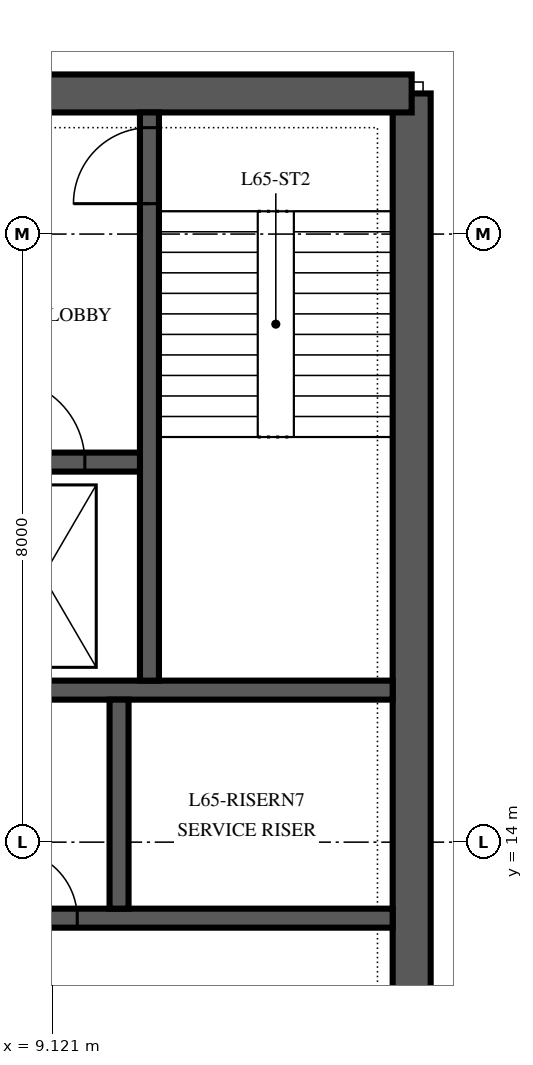
"""IFC4 building model, lengths in metres.
Left out: names, types, materials, properties, quantities, classifications, styles, units other than length and angle.
Written with IfcOpenShell. Run it as: python <this file> out.ifc"""

import sys

from ifc_helpers import new_model, si_unit, direction, frame, frame_2d, origin, place, context, subcontext, project, spatial, polyline, rectangle, outline, extrude, element, fill, save


model = new_model("IFC4")
c1 = context("Model", 3, precision=1e-05, world=origin(), true_north=direction((0.0, 1.0)))
c2 = subcontext(c1, "Body", "Model", "MODEL_VIEW")
j1 = project(units=[si_unit("LENGTHUNIT", "METRE"), si_unit("PLANEANGLEUNIT", "RADIAN")], contexts=[c1])
p1 = place(None, origin())
s1 = spatial("IfcSite", under=j1, at=p1, CompositionType="ELEMENT")
p2 = place(p1, origin())
s2 = spatial("IfcBuilding", under=s1, at=p2, CompositionType="ELEMENT")
p3 = place(p2, frame((0.0, 0.0, 280.0)))
s3 = spatial("IfcBuildingStorey", under=s2, at=p3, CompositionType="ELEMENT", Elevation=280.0)
p4 = place(p3, frame((13.85, 6.15, 0.0), z_axis=(0.0, 0.0, 1.0), x_axis=(0.0, 1.0, 0.0)))
e1 = element("IfcWall", 1, at=p4, inside=s3, PredefinedType="SHEAR", context=c2, shape_type="SweptSolid", body=[
    extrude(outline(polyline([(0.0, -0.25), (17.7, -0.25), (17.7, 0.0), (17.45, 0.0), (17.45, 0.25), (0.25, 0.25), (0.25, 0.0), (0.0, 0.0), (0.0, -0.25)])), origin(), (0.0, 0.0, 1.0), 4.0),
])
p5 = place(p4, frame((4.15, 0.0, 0.0)))
e2 = element("IfcOpeningElement", 2, at=p5, cuts=e1, PredefinedType="OPENING", context=c2, shape_type="SweptSolid", body=[
    extrude(rectangle(XDim=1.8, YDim=2.4, at=frame_2d((0.9, 1.2))), frame((0.0, 0.265, 0.0), z_axis=(0.0, -1.0, 0.0), x_axis=(1.0, 0.0, 0.0)), (0.0, 0.0, 1.0), 0.53),
])
p6 = place(p3, frame((13.85, 23.85, 0.0), z_axis=(0.0, 0.0, 1.0), x_axis=(-1.0, 0.0, 0.0)))
e3 = element("IfcWall", 3, at=p6, inside=s3, PredefinedType="SHEAR", context=c2, shape_type="SweptSolid", body=[
    extrude(rectangle(XDim=27.7, YDim=0.5, at=frame_2d((13.85, 0.0))), origin(), (0.0, 0.0, 1.0), 4.0),
])
p7 = place(p6, frame((21.75, 0.0, 0.0)))
e4 = element("IfcOpeningElement", 4, at=p7, cuts=e3, PredefinedType="OPENING", context=c2, shape_type="SweptSolid", body=[
    extrude(rectangle(XDim=1.0, YDim=2.1, at=frame_2d((0.5, 1.05))), frame((0.0, 0.265, 0.0), z_axis=(0.0, -1.0, 0.0), x_axis=(1.0, 0.0, 0.0)), (0.0, 0.0, 1.0), 0.53),
])
p8 = place(p6, frame((4.95, 0.0, 0.0)))
e5 = element("IfcOpeningElement", 5, at=p8, cuts=e3, PredefinedType="OPENING", context=c2, shape_type="SweptSolid", body=[
    extrude(rectangle(XDim=1.0, YDim=2.1, at=frame_2d((0.5, 1.05))), frame((0.0, 0.265, 0.0), z_axis=(0.0, -1.0, 0.0), x_axis=(1.0, 0.0, 0.0)), (0.0, 0.0, 1.0), 0.53),
])
p9 = place(p6, frame((17.35, 0.0, 0.0)))
e6 = element("IfcOpeningElement", 6, at=p9, cuts=e3, PredefinedType="OPENING", context=c2, shape_type="SweptSolid", body=[
    extrude(rectangle(XDim=1.0, YDim=2.1, at=frame_2d((0.5, 1.05))), frame((0.0, 0.265, 0.0), z_axis=(0.0, -1.0, 0.0), x_axis=(1.0, 0.0, 0.0)), (0.0, 0.0, 1.0), 0.53),
])
p10 = place(p6, frame((13.35, 0.0, 0.0)))
e7 = element("IfcOpeningElement", 7, at=p10, cuts=e3, PredefinedType="OPENING", context=c2, shape_type="SweptSolid", body=[
    extrude(rectangle(XDim=1.0, YDim=2.1, at=frame_2d((0.5, 1.05))), frame((0.0, 0.265, 0.0), z_axis=(0.0, -1.0, 0.0), x_axis=(1.0, 0.0, 0.0)), (0.0, 0.0, 1.0), 0.53),
])
p11 = place(p6, frame((9.35, 0.0, 0.0)))
e8 = element("IfcOpeningElement", 8, at=p11, cuts=e3, PredefinedType="OPENING", context=c2, shape_type="SweptSolid", body=[
    extrude(rectangle(XDim=1.0, YDim=2.1, at=frame_2d((0.5, 1.05))), frame((0.0, 0.265, 0.0), z_axis=(0.0, -1.0, 0.0), x_axis=(1.0, 0.0, 0.0)), (0.0, 0.0, 1.0), 0.53),
])
p12 = place(p3, frame((-13.6, 13.0, 0.0), z_axis=(0.0, 0.0, 1.0), x_axis=(1.0, 0.0, 0.0)))
e9 = element("IfcWall", 9, at=p12, inside=s3, PredefinedType="SHEAR", context=c2, shape_type="SweptSolid", body=[
    extrude(rectangle(XDim=27.2, YDim=0.25, at=frame_2d((13.6, 0.0))), origin(), (0.0, 0.0, 1.0), 4.0),
])
p13 = place(p12, frame((16.75, 0.0, 0.0)))
e10 = element("IfcOpeningElement", 10, at=p13, cuts=e9, PredefinedType="OPENING", context=c2, shape_type="SweptSolid", body=[
    extrude(rectangle(XDim=0.9, YDim=2.1, at=frame_2d((0.45, 1.05))), frame((0.0, 0.14, 0.0), z_axis=(0.0, -1.0, 0.0), x_axis=(1.0, 0.0, 0.0)), (0.0, 0.0, 1.0), 0.28),
])
p14 = place(p12, frame((20.15, 0.0, 0.0)))
e11 = element("IfcOpeningElement", 11, at=p14, cuts=e9, PredefinedType="OPENING", context=c2, shape_type="SweptSolid", body=[
    extrude(rectangle(XDim=0.9, YDim=2.1, at=frame_2d((0.45, 1.05))), frame((0.0, 0.14, 0.0), z_axis=(0.0, -1.0, 0.0), x_axis=(1.0, 0.0, 0.0)), (0.0, 0.0, 1.0), 0.28),
])
p15 = place(p12, frame((22.15, 0.0, 0.0)))
e12 = element("IfcOpeningElement", 12, at=p15, cuts=e9, PredefinedType="OPENING", context=c2, shape_type="SweptSolid", body=[
    extrude(rectangle(XDim=0.9, YDim=2.1, at=frame_2d((0.45, 1.05))), frame((0.0, 0.14, 0.0), z_axis=(0.0, -1.0, 0.0), x_axis=(1.0, 0.0, 0.0)), (0.0, 0.0, 1.0), 0.28),
])
p16 = place(p12, frame((0.55, 0.0, 0.0)))
e13 = element("IfcOpeningElement", 13, at=p16, cuts=e9, PredefinedType="OPENING", context=c2, shape_type="SweptSolid", body=[
    extrude(rectangle(XDim=0.9, YDim=2.1, at=frame_2d((0.45, 1.05))), frame((0.0, 0.14, 0.0), z_axis=(0.0, -1.0, 0.0), x_axis=(1.0, 0.0, 0.0)), (0.0, 0.0, 1.0), 0.28),
])
p17 = place(p12, frame((3.35, 0.0, 0.0)))
e14 = element("IfcOpeningElement", 14, at=p17, cuts=e9, PredefinedType="OPENING", context=c2, shape_type="SweptSolid", body=[
    extrude(rectangle(XDim=0.9, YDim=2.1, at=frame_2d((0.45, 1.05))), frame((0.0, 0.14, 0.0), z_axis=(0.0, -1.0, 0.0), x_axis=(1.0, 0.0, 0.0)), (0.0, 0.0, 1.0), 0.28),
])
p18 = place(p12, frame((6.15, 0.0, 0.0)))
e15 = element("IfcOpeningElement", 15, at=p18, cuts=e9, PredefinedType="OPENING", context=c2, shape_type="SweptSolid", body=[
    extrude(rectangle(XDim=0.9, YDim=2.1, at=frame_2d((0.45, 1.05))), frame((0.0, 0.14, 0.0), z_axis=(0.0, -1.0, 0.0), x_axis=(1.0, 0.0, 0.0)), (0.0, 0.0, 1.0), 0.28),
])
p19 = place(p3, frame((-13.6, 16.0, 0.0), z_axis=(0.0, 0.0, 1.0), x_axis=(1.0, 0.0, 0.0)))
e16 = element("IfcWall", 16, at=p19, inside=s3, PredefinedType="SHEAR", context=c2, shape_type="SweptSolid", body=[
    extrude(rectangle(XDim=27.2, YDim=0.25, at=frame_2d((13.6, 0.0))), origin(), (0.0, 0.0, 1.0), 4.0),
])
p20 = place(p3, frame((10.0, 13.125, 0.0), z_axis=(0.0, 0.0, 1.0), x_axis=(0.0, 1.0, 0.0)))
e17 = element("IfcWall", 17, at=p20, inside=s3, PredefinedType="SHEAR", context=c2, shape_type="SweptSolid", body=[
    extrude(rectangle(XDim=2.75, YDim=0.25, at=frame_2d((1.375, 0.0))), origin(), (0.0, 0.0, 1.0), 4.0),
])
p21 = place(p3, frame((10.4, 16.125, 0.0), z_axis=(0.0, 0.0, 1.0), x_axis=(0.0, 1.0, 0.0)))
e18 = element("IfcWall", 18, at=p21, inside=s3, PredefinedType="SHEAR", context=c2, shape_type="SweptSolid", body=[
    extrude(rectangle(XDim=7.475, YDim=0.25, at=frame_2d((3.738, 0.0))), origin(), (0.0, 0.0, 1.0), 4.0),
])
p22 = place(p21, frame((6.275, 0.0, 0.0)))
e19 = element("IfcOpeningElement", 19, at=p22, cuts=e18, PredefinedType="OPENING", context=c2, shape_type="SweptSolid", body=[
    extrude(rectangle(XDim=1.0, YDim=2.1, at=frame_2d((0.5, 1.05))), frame((0.0, 0.14, 0.0), z_axis=(0.0, -1.0, 0.0), x_axis=(1.0, 0.0, 0.0)), (0.0, 0.0, 1.0), 0.28),
])
p23 = place(p3, frame((6.525, 19.0, 0.0), z_axis=(0.0, 0.0, 1.0), x_axis=(1.0, 0.0, 0.0)))
e20 = element("IfcWall", 20, at=p23, inside=s3, PredefinedType="SHEAR", context=c2, shape_type="SweptSolid", body=[
    extrude(rectangle(XDim=3.75, YDim=0.25, at=frame_2d((1.875, 0.0))), origin(), (0.0, 0.0, 1.0), 4.0),
])
p24 = place(p23, frame((1.925, 0.0, 0.0)))
e21 = element("IfcOpeningElement", 21, at=p24, cuts=e20, PredefinedType="OPENING", context=c2, shape_type="SweptSolid", body=[
    extrude(rectangle(XDim=1.1, YDim=2.1, at=frame_2d((0.55, 1.05))), frame((0.0, 0.14, 0.0), z_axis=(0.0, -1.0, 0.0), x_axis=(1.0, 0.0, 0.0)), (0.0, 0.0, 1.0), 0.28),
])
p25 = place(p22, origin())
e22 = element("IfcDoor", 22, at=p25, inside=s3, OperationType="SINGLE_SWING_LEFT", PredefinedType="DOOR", context=c2, shape_type="SweptSolid", body=[
    extrude(rectangle(XDim=1.0, YDim=2.1, at=frame_2d((0.5, 1.05))), frame((0.0, 0.125, 0.0), z_axis=(0.0, -1.0, 0.0), x_axis=(1.0, 0.0, 0.0)), (0.0, 0.0, 1.0), 0.25),
])
fill(e19, e22)
p26 = place(p24, origin())
e23 = element("IfcDoor", 23, at=p26, inside=s3, OperationType="SLIDING_TO_RIGHT", PredefinedType="DOOR", context=c2, shape_type="SweptSolid", body=[
    extrude(rectangle(XDim=1.1, YDim=2.1, at=frame_2d((0.55, 1.05))), frame((0.0, 0.125, 0.0), z_axis=(0.0, -1.0, 0.0), x_axis=(1.0, 0.0, 0.0)), (0.0, 0.0, 1.0), 0.25),
])
fill(e21, e23)
p27 = place(p15, origin())
e24 = element("IfcDoor", 24, at=p27, inside=s3, OperationType="SINGLE_SWING_LEFT", PredefinedType="DOOR", context=c2, shape_type="SweptSolid", body=[
    extrude(rectangle(XDim=0.9, YDim=2.1, at=frame_2d((0.45, 1.05))), frame((0.0, 0.125, 0.0), z_axis=(0.0, -1.0, 0.0), x_axis=(1.0, 0.0, 0.0)), (0.0, 0.0, 1.0), 0.25),
])
fill(e12, e24)
save(model, sys.argv[1])
